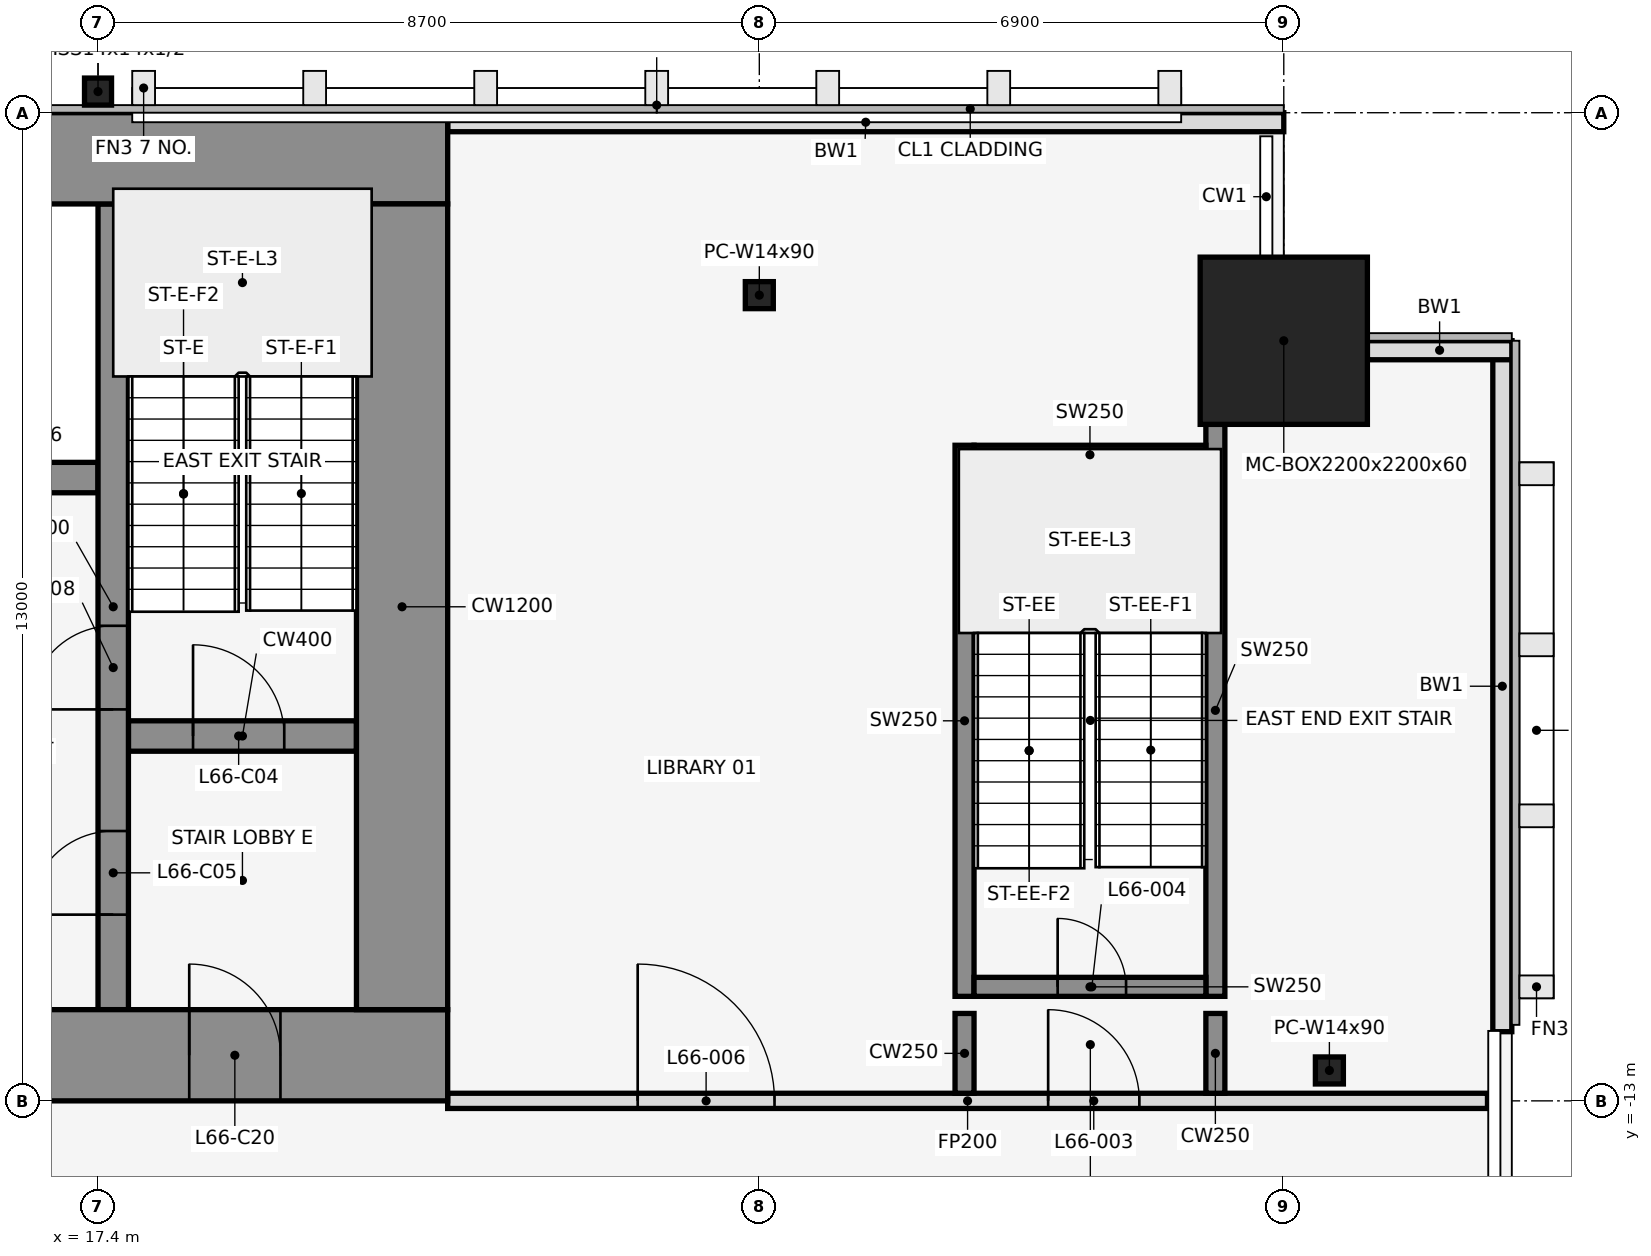
"""IFC4 building model, lengths in metres.
Left out: names, types, materials, properties, quantities, classifications, styles, units other than length and angle.
Written with IfcOpenShell. Run it as: python <this file> out.ifc"""

import sys

from ifc_helpers import new_model, si_unit, direction, frame, frame_2d, origin, origin_2d, place, context, subcontext, project, spatial, rectangle, hollow_rectangle, i_section, extrude, element, fill, save


model = new_model("IFC4")
c1 = context("Model", 3, precision=1e-05, world=origin(), true_north=direction((0.0, 1.0)))
c2 = subcontext(c1, "Body", "Model", "MODEL_VIEW")
j1 = project(units=[si_unit("LENGTHUNIT", "METRE"), si_unit("PLANEANGLEUNIT", "RADIAN")], contexts=[c1])
p1 = place(None, origin())
s1 = spatial("IfcSite", under=j1, at=p1, CompositionType="ELEMENT")
p2 = place(p1, origin())
s2 = spatial("IfcBuilding", under=s1, at=p2, CompositionType="ELEMENT")
p3 = place(p2, frame((0.0, 0.0, 293.0)))
s3 = spatial("IfcBuildingStorey", under=s2, at=p3, CompositionType="ELEMENT", Elevation=293.0)
p4 = place(p3, frame((26.1, -2.4, 0.0), z_axis=(0.0, 0.0, 1.0), x_axis=(1.0, 0.0, 0.0)))
e1 = element("IfcColumn", 1, at=p4, inside=s3, PredefinedType="COLUMN", context=c2, shape_type="SweptSolid", body=[
    extrude(i_section(OverallWidth=0.368, OverallDepth=0.356, WebThickness=0.011, FlangeThickness=0.018, at=origin_2d()), origin(), (0.0, 0.0, 1.0), 4.5),
])
p5 = place(p3, frame((33.0, -3.0, 0.0), z_axis=(0.0, 0.0, 1.0), x_axis=(1.0, 0.0, 0.0)))
e2 = element("IfcColumn", 2, at=p5, inside=s3, PredefinedType="COLUMN", context=c2, shape_type="SweptSolid", body=[
    extrude(hollow_rectangle(XDim=2.2, YDim=2.2, WallThickness=0.06, at=origin_2d()), origin(), (0.0, 0.0, 1.0), 4.5),
])
p6 = place(p3, frame((17.4, 0.278, 0.0), z_axis=(0.0, 0.0, 1.0), x_axis=(1.0, 0.0, 0.0)))
e3 = element("IfcColumn", 3, at=p6, inside=s3, PredefinedType="COLUMN", context=c2, shape_type="SweptSolid", body=[
    extrude(hollow_rectangle(XDim=0.356, YDim=0.356, WallThickness=0.012, at=origin_2d()), origin(), (0.0, 0.0, 1.0), 4.5),
])
p7 = place(p3, frame((33.6, -12.6, 0.0), z_axis=(0.0, 0.0, 1.0), x_axis=(1.0, 0.0, 0.0)))
e4 = element("IfcColumn", 4, at=p7, inside=s3, PredefinedType="COLUMN", context=c2, shape_type="SweptSolid", body=[
    extrude(i_section(OverallWidth=0.368, OverallDepth=0.356, WebThickness=0.011, FlangeThickness=0.018, at=origin_2d()), origin(), (0.0, 0.0, 1.0), 4.5),
])
p8 = place(p3, frame((33.0, -0.125, 0.0), z_axis=(0.0, 0.0, 1.0), x_axis=(-1.0, 0.0, 0.0)))
e5 = element("IfcWall", 5, at=p8, inside=s3, PredefinedType="STANDARD", context=c2, shape_type="SweptSolid", body=[
    extrude(rectangle(XDim=11.0, YDim=0.25, at=frame_2d((5.5, 0.0))), origin(), (0.0, 0.0, 1.0), 4.35),
])
p9 = place(p3, frame((35.875, -12.09, 0.0), z_axis=(0.0, 0.0, 1.0), x_axis=(0.0, 1.0, 0.0)))
e6 = element("IfcWall", 6, at=p9, inside=s3, PredefinedType="STANDARD", context=c2, shape_type="SweptSolid", body=[
    extrude(rectangle(XDim=9.09, YDim=0.25, at=frame_2d((4.545, 0.0))), origin(), (0.0, 0.0, 1.0), 4.35),
])
p10 = place(p3, frame((36.0, -3.125, 0.0), z_axis=(0.0, 0.0, 1.0), x_axis=(-1.0, 0.0, 0.0)))
e7 = element("IfcWall", 7, at=p10, inside=s3, PredefinedType="STANDARD", context=c2, shape_type="SweptSolid", body=[
    extrude(rectangle(XDim=1.9, YDim=0.25, at=frame_2d((0.95, 0.0))), origin(), (0.0, 0.0, 1.0), 4.35),
])
p11 = place(p3, frame((28.8, -11.625, 0.0), z_axis=(0.0, 0.0, 1.0), x_axis=(0.0, 1.0, 0.0)))
e8 = element("IfcWall", 8, at=p11, inside=s3, PredefinedType="SHEAR", context=c2, shape_type="SweptSolid", body=[
    extrude(rectangle(XDim=7.25, YDim=0.25, at=frame_2d((3.625, 0.0))), origin(), (0.0, 0.0, 1.0), 4.5),
])
p12 = place(p3, frame((32.1, -11.625, 0.0), z_axis=(0.0, 0.0, 1.0), x_axis=(0.0, 1.0, 0.0)))
e9 = element("IfcWall", 9, at=p12, inside=s3, PredefinedType="SHEAR", context=c2, shape_type="SweptSolid", body=[
    extrude(rectangle(XDim=7.525, YDim=0.25, at=frame_2d((3.762, 0.0))), origin(), (0.0, 0.0, 1.0), 4.5),
])
p13 = place(p3, frame((28.925, -11.5, 0.0), z_axis=(0.0, 0.0, 1.0), x_axis=(1.0, 0.0, 0.0)))
e10 = element("IfcWall", 10, at=p13, inside=s3, PredefinedType="SHEAR", context=c2, shape_type="SweptSolid", body=[
    extrude(rectangle(XDim=3.05, YDim=0.25, at=frame_2d((1.525, 0.0))), origin(), (0.0, 0.0, 1.0), 4.5),
])
p14 = place(p13, frame((1.1, 0.0, 0.0)))
e11 = element("IfcOpeningElement", 11, at=p14, cuts=e10, PredefinedType="OPENING", context=c2, shape_type="SweptSolid", body=[
    extrude(rectangle(XDim=0.9, YDim=2.1, at=frame_2d((0.45, 1.05))), frame((0.0, 0.137, 0.0), z_axis=(0.0, -1.0, 0.0), x_axis=(1.0, 0.0, 0.0)), (0.0, 0.0, 1.0), 0.274),
])
p15 = place(p3, frame((28.925, -4.5, 0.0), z_axis=(0.0, 0.0, 1.0), x_axis=(1.0, 0.0, 0.0)))
e12 = element("IfcWall", 12, at=p15, inside=s3, PredefinedType="SHEAR", context=c2, shape_type="SweptSolid", body=[
    extrude(rectangle(XDim=3.05, YDim=0.25, at=frame_2d((1.525, 0.0))), origin(), (0.0, 0.0, 1.0), 4.5),
])
p16 = place(p3, frame((22.0, -13.0, 0.0), z_axis=(0.0, 0.0, 1.0), x_axis=(1.0, 0.0, 0.0)))
e13 = element("IfcWall", 13, at=p16, inside=s3, PredefinedType="PARTITIONING", context=c2, shape_type="SweptSolid", body=[
    extrude(rectangle(XDim=13.68, YDim=0.2, at=frame_2d((6.84, 0.0))), origin(), (0.0, 0.0, 1.0), 3.418),
])
p17 = place(p16, frame((7.9, 0.0, 0.0)))
e14 = element("IfcOpeningElement", 14, at=p17, cuts=e13, PredefinedType="OPENING", context=c2, shape_type="SweptSolid", body=[
    extrude(rectangle(XDim=1.2, YDim=2.1, at=frame_2d((0.6, 1.05))), frame((0.0, 0.112, 0.0), z_axis=(0.0, -1.0, 0.0), x_axis=(1.0, 0.0, 0.0)), (0.0, 0.0, 1.0), 0.224),
])
p18 = place(p16, frame((2.5, 0.0, 0.0)))
e15 = element("IfcOpeningElement", 15, at=p18, cuts=e13, PredefinedType="OPENING", context=c2, shape_type="SweptSolid", body=[
    extrude(rectangle(XDim=1.8, YDim=2.1, at=frame_2d((0.9, 1.05))), frame((0.0, 0.112, 0.0), z_axis=(0.0, -1.0, 0.0), x_axis=(1.0, 0.0, 0.0)), (0.0, 0.0, 1.0), 0.224),
])
for number, where, z_axis, x_axis in (
    (16, (28.8, -12.9, 0.0), (0.0, 0.0, 1.0), (0.0, 1.0, 0.0)),
    (17, (32.1, -12.9, 0.0), (0.0, 0.0, 1.0), (0.0, 1.0, 0.0)),
):
    element("IfcWall", number, at=place(p3, frame(where, z_axis=z_axis, x_axis=x_axis)), inside=s3, PredefinedType="SHEAR", context=c2, shape_type="SweptSolid", body=[
        extrude(rectangle(XDim=1.05, YDim=0.25, at=frame_2d((0.525, 0.0))), origin(), (0.0, 0.0, 1.0), 4.5),
    ])
p19 = place(p3, frame((17.8, -8.2, 0.0), z_axis=(0.0, 0.0, 1.0), x_axis=(1.0, 0.0, 0.0)))
e18 = element("IfcWall", 18, at=p19, inside=s3, PredefinedType="SHEAR", context=c2, shape_type="SweptSolid", body=[
    extrude(rectangle(XDim=3.0, YDim=0.4, at=frame_2d((1.5, 0.0))), origin(), (0.0, 0.0, 1.0), 4.5),
])
p20 = place(p19, frame((0.85, 0.0, 0.0)))
e19 = element("IfcOpeningElement", 19, at=p20, cuts=e18, PredefinedType="OPENING", context=c2, shape_type="SweptSolid", body=[
    extrude(rectangle(XDim=1.2, YDim=2.1, at=frame_2d((0.6, 1.05))), frame((0.0, 0.212, 0.0), z_axis=(0.0, -1.0, 0.0), x_axis=(1.0, 0.0, 0.0)), (0.0, 0.0, 1.0), 0.424),
])
p21 = place(p3, frame((3.8, -4.8, 0.0), z_axis=(0.0, 0.0, 1.0), x_axis=(1.0, 0.0, 0.0)))
e20 = element("IfcWall", 20, at=p21, inside=s3, PredefinedType="SHEAR", context=c2, shape_type="SweptSolid", body=[
    extrude(rectangle(XDim=13.6, YDim=0.4, at=frame_2d((6.8, 0.0))), origin(), (0.0, 0.0, 1.0), 4.5),
])
p22 = place(p21, frame((0.75, 0.0, 0.0)))
e21 = element("IfcOpeningElement", 21, at=p22, cuts=e20, PredefinedType="OPENING", context=c2, shape_type="SweptSolid", body=[
    extrude(rectangle(XDim=1.2, YDim=2.1, at=frame_2d((0.6, 1.05))), frame((0.0, 0.212, 0.0), z_axis=(0.0, -1.0, 0.0), x_axis=(1.0, 0.0, 0.0)), (0.0, 0.0, 1.0), 0.424),
])
p23 = place(p21, frame((3.65, 0.0, 0.0)))
e22 = element("IfcOpeningElement", 22, at=p23, cuts=e20, PredefinedType="OPENING", context=c2, shape_type="SweptSolid", body=[
    extrude(rectangle(XDim=1.2, YDim=2.1, at=frame_2d((0.6, 1.05))), frame((0.0, 0.212, 0.0), z_axis=(0.0, -1.0, 0.0), x_axis=(1.0, 0.0, 0.0)), (0.0, 0.0, 1.0), 0.424),
])
p24 = place(p21, frame((6.65, 0.0, 0.0)))
e23 = element("IfcOpeningElement", 23, at=p24, cuts=e20, PredefinedType="OPENING", context=c2, shape_type="SweptSolid", body=[
    extrude(rectangle(XDim=1.2, YDim=2.1, at=frame_2d((0.6, 1.05))), frame((0.0, 0.212, 0.0), z_axis=(0.0, -1.0, 0.0), x_axis=(1.0, 0.0, 0.0)), (0.0, 0.0, 1.0), 0.424),
])
p25 = place(p21, frame((9.45, 0.0, 0.0)))
e24 = element("IfcOpeningElement", 24, at=p25, cuts=e20, PredefinedType="OPENING", context=c2, shape_type="SweptSolid", body=[
    extrude(rectangle(XDim=1.1, YDim=2.1, at=frame_2d((0.55, 1.05))), frame((0.0, 0.212, 0.0), z_axis=(0.0, -1.0, 0.0), x_axis=(1.0, 0.0, 0.0)), (0.0, 0.0, 1.0), 0.424),
])
p26 = place(p21, frame((11.85, 0.0, 0.0)))
e25 = element("IfcOpeningElement", 25, at=p26, cuts=e20, PredefinedType="OPENING", context=c2, shape_type="SweptSolid", body=[
    extrude(rectangle(XDim=1.1, YDim=2.1, at=frame_2d((0.55, 1.05))), frame((0.0, 0.212, 0.0), z_axis=(0.0, -1.0, 0.0), x_axis=(1.0, 0.0, 0.0)), (0.0, 0.0, 1.0), 0.424),
])
p27 = place(p3, frame((17.6, -11.8, 0.0), z_axis=(0.0, 0.0, 1.0), x_axis=(0.0, 1.0, 0.0)))
e26 = element("IfcWall", 26, at=p27, inside=s3, PredefinedType="SHEAR", context=c2, shape_type="SweptSolid", body=[
    extrude(rectangle(XDim=10.6, YDim=0.4, at=frame_2d((5.3, 0.0))), origin(), (0.0, 0.0, 1.0), 4.5),
])
p28 = place(p27, frame((1.25, 0.0, 0.0)))
e27 = element("IfcOpeningElement", 27, at=p28, cuts=e26, PredefinedType="OPENING", context=c2, shape_type="SweptSolid", body=[
    extrude(rectangle(XDim=1.1, YDim=2.1, at=frame_2d((0.55, 1.05))), frame((0.0, 0.212, 0.0), z_axis=(0.0, -1.0, 0.0), x_axis=(1.0, 0.0, 0.0)), (0.0, 0.0, 1.0), 0.424),
])
p29 = place(p27, frame((3.95, 0.0, 0.0)))
e28 = element("IfcOpeningElement", 28, at=p29, cuts=e26, PredefinedType="OPENING", context=c2, shape_type="SweptSolid", body=[
    extrude(rectangle(XDim=1.1, YDim=2.1, at=frame_2d((0.55, 1.05))), frame((0.0, 0.212, 0.0), z_axis=(0.0, -1.0, 0.0), x_axis=(1.0, 0.0, 0.0)), (0.0, 0.0, 1.0), 0.424),
])
p30 = place(p3, frame((-22.0, -0.6, 0.0), z_axis=(0.0, 0.0, 1.0), x_axis=(1.0, 0.0, 0.0)))
e29 = element("IfcWall", 29, at=p30, inside=s3, PredefinedType="SHEAR", context=c2, shape_type="SweptSolid", body=[
    extrude(rectangle(XDim=44.0, YDim=1.2, at=frame_2d((22.0, 0.0))), origin(), (0.0, 0.0, 1.0), 4.5),
])
p31 = place(p30, frame((18.55, 0.0, 0.0)))
e30 = element("IfcOpeningElement", 30, at=p31, cuts=e29, PredefinedType="OPENING", context=c2, shape_type="SweptSolid", body=[
    extrude(rectangle(XDim=0.9, YDim=2.1, at=frame_2d((0.45, 1.05))), frame((0.0, 0.612, 0.0), z_axis=(0.0, -1.0, 0.0), x_axis=(1.0, 0.0, 0.0)), (0.0, 0.0, 1.0), 1.224),
])
p32 = place(p30, frame((24.55, 0.0, 0.0)))
e31 = element("IfcOpeningElement", 31, at=p32, cuts=e29, PredefinedType="OPENING", context=c2, shape_type="SweptSolid", body=[
    extrude(rectangle(XDim=0.9, YDim=2.1, at=frame_2d((0.45, 1.05))), frame((0.0, 0.612, 0.0), z_axis=(0.0, -1.0, 0.0), x_axis=(1.0, 0.0, 0.0)), (0.0, 0.0, 1.0), 1.224),
])
p33 = place(p3, frame((-22.0, -12.4, 0.0), z_axis=(0.0, 0.0, 1.0), x_axis=(1.0, 0.0, 0.0)))
e32 = element("IfcWall", 32, at=p33, inside=s3, PredefinedType="SHEAR", context=c2, shape_type="SweptSolid", body=[
    extrude(rectangle(XDim=44.0, YDim=1.2, at=frame_2d((22.0, 0.0))), origin(), (0.0, 0.0, 1.0), 4.5),
])
p34 = place(p33, frame((2.2, 0.0, 0.0)))
e33 = element("IfcOpeningElement", 33, at=p34, cuts=e32, PredefinedType="OPENING", context=c2, shape_type="SweptSolid", body=[
    extrude(rectangle(XDim=1.2, YDim=2.1, at=frame_2d((0.6, 1.05))), frame((0.0, 0.612, 0.0), z_axis=(0.0, -1.0, 0.0), x_axis=(1.0, 0.0, 0.0)), (0.0, 0.0, 1.0), 1.224),
])
p35 = place(p33, frame((21.4, 0.0, 0.0)))
e34 = element("IfcOpeningElement", 34, at=p35, cuts=e32, PredefinedType="OPENING", context=c2, shape_type="SweptSolid", body=[
    extrude(rectangle(XDim=1.2, YDim=2.1, at=frame_2d((0.6, 1.05))), frame((0.0, 0.612, 0.0), z_axis=(0.0, -1.0, 0.0), x_axis=(1.0, 0.0, 0.0)), (0.0, 0.0, 1.0), 1.224),
])
p36 = place(p33, frame((40.6, 0.0, 0.0)))
e35 = element("IfcOpeningElement", 35, at=p36, cuts=e32, PredefinedType="OPENING", context=c2, shape_type="SweptSolid", body=[
    extrude(rectangle(XDim=1.2, YDim=2.1, at=frame_2d((0.6, 1.05))), frame((0.0, 0.612, 0.0), z_axis=(0.0, -1.0, 0.0), x_axis=(1.0, 0.0, 0.0)), (0.0, 0.0, 1.0), 1.224),
])
p37 = place(p33, frame((16.0, 0.0, 0.0)))
e36 = element("IfcOpeningElement", 36, at=p37, cuts=e32, PredefinedType="OPENING", context=c2, shape_type="SweptSolid", body=[
    extrude(rectangle(XDim=1.8, YDim=2.1, at=frame_2d((0.9, 1.05))), frame((0.0, 0.612, 0.0), z_axis=(0.0, -1.0, 0.0), x_axis=(1.0, 0.0, 0.0)), (0.0, 0.0, 1.0), 1.224),
])
p38 = place(p33, frame((6.3, 0.0, 0.0)))
e37 = element("IfcOpeningElement", 37, at=p38, cuts=e32, PredefinedType="OPENING", context=c2, shape_type="SweptSolid", body=[
    extrude(rectangle(XDim=1.2, YDim=2.1, at=frame_2d((0.6, 1.05))), frame((0.0, 0.612, 0.0), z_axis=(0.0, -1.0, 0.0), x_axis=(1.0, 0.0, 0.0)), (0.0, 0.0, 1.0), 1.224),
])
p39 = place(p33, frame((26.2, 0.0, 0.0)))
e38 = element("IfcOpeningElement", 38, at=p39, cuts=e32, PredefinedType="OPENING", context=c2, shape_type="SweptSolid", body=[
    extrude(rectangle(XDim=1.8, YDim=2.1, at=frame_2d((0.9, 1.05))), frame((0.0, 0.612, 0.0), z_axis=(0.0, -1.0, 0.0), x_axis=(1.0, 0.0, 0.0)), (0.0, 0.0, 1.0), 1.224),
])
p40 = place(p33, frame((36.5, 0.0, 0.0)))
e39 = element("IfcOpeningElement", 39, at=p40, cuts=e32, PredefinedType="OPENING", context=c2, shape_type="SweptSolid", body=[
    extrude(rectangle(XDim=1.2, YDim=2.1, at=frame_2d((0.6, 1.05))), frame((0.0, 0.612, 0.0), z_axis=(0.0, -1.0, 0.0), x_axis=(1.0, 0.0, 0.0)), (0.0, 0.0, 1.0), 1.224),
])
p41 = place(p3, frame((21.4, -11.8, 0.0), z_axis=(0.0, 0.0, 1.0), x_axis=(0.0, 1.0, 0.0)))
e40 = element("IfcWall", 40, at=p41, inside=s3, PredefinedType="SHEAR", context=c2, shape_type="SweptSolid", body=[
    extrude(rectangle(XDim=10.6, YDim=1.2, at=frame_2d((5.3, 0.0))), origin(), (0.0, 0.0, 1.0), 4.5),
])
p42 = place(p17, origin())
e41 = element("IfcDoor", 41, at=p42, inside=s3, OperationType="SINGLE_SWING_RIGHT", PredefinedType="DOOR", context=c2, shape_type="SweptSolid", body=[
    extrude(rectangle(XDim=1.2, YDim=2.1, at=frame_2d((0.6, 1.05))), frame((0.0, 0.025, 0.0), z_axis=(0.0, -1.0, 0.0), x_axis=(1.0, 0.0, 0.0)), (0.0, 0.0, 1.0), 0.05),
])
fill(e14, e41)
p43 = place(p14, origin())
e42 = element("IfcDoor", 42, at=p43, inside=s3, OperationType="SINGLE_SWING_LEFT", PredefinedType="DOOR", context=c2, shape_type="SweptSolid", body=[
    extrude(rectangle(XDim=0.9, YDim=2.1, at=frame_2d((0.45, 1.05))), frame((0.0, 0.025, 0.0), z_axis=(0.0, -1.0, 0.0), x_axis=(1.0, 0.0, 0.0)), (0.0, 0.0, 1.0), 0.05),
])
fill(e11, e42)
p44 = place(p18, origin())
e43 = element("IfcDoor", 43, at=p44, inside=s3, OperationType="SINGLE_SWING_LEFT", PredefinedType="DOOR", context=c2, shape_type="SweptSolid", body=[
    extrude(rectangle(XDim=1.8, YDim=2.1, at=frame_2d((0.9, 1.05))), frame((0.0, 0.025, 0.0), z_axis=(0.0, -1.0, 0.0), x_axis=(1.0, 0.0, 0.0)), (0.0, 0.0, 1.0), 0.05),
])
fill(e15, e43)
p45 = place(p20, origin())
e44 = element("IfcDoor", 44, at=p45, inside=s3, OperationType="SINGLE_SWING_RIGHT", PredefinedType="DOOR", context=c2, shape_type="SweptSolid", body=[
    extrude(rectangle(XDim=1.2, YDim=2.1, at=frame_2d((0.6, 1.05))), frame((0.0, 0.025, 0.0), z_axis=(0.0, -1.0, 0.0), x_axis=(1.0, 0.0, 0.0)), (0.0, 0.0, 1.0), 0.05),
])
fill(e19, e44)
p46 = place(p28, origin())
e45 = element("IfcDoor", 45, at=p46, inside=s3, OperationType="SINGLE_SWING_LEFT", PredefinedType="DOOR", context=c2, shape_type="SweptSolid", body=[
    extrude(rectangle(XDim=1.1, YDim=2.1, at=frame_2d((0.55, 1.05))), frame((0.0, 0.025, 0.0), z_axis=(0.0, -1.0, 0.0), x_axis=(1.0, 0.0, 0.0)), (0.0, 0.0, 1.0), 0.05),
])
fill(e27, e45)
p47 = place(p29, origin())
e46 = element("IfcDoor", 46, at=p47, inside=s3, OperationType="SINGLE_SWING_RIGHT", PredefinedType="DOOR", context=c2, shape_type="SweptSolid", body=[
    extrude(rectangle(XDim=1.1, YDim=2.1, at=frame_2d((0.55, 1.05))), frame((0.0, 0.025, 0.0), z_axis=(0.0, -1.0, 0.0), x_axis=(1.0, 0.0, 0.0)), (0.0, 0.0, 1.0), 0.05),
])
fill(e28, e46)
p48 = place(p36, frame((1.2, 0.0, 0.0), z_axis=(0.0, 0.0, 1.0), x_axis=(-1.0, 0.0, 0.0)))
e47 = element("IfcDoor", 47, at=p48, inside=s3, OperationType="SINGLE_SWING_RIGHT", PredefinedType="DOOR", context=c2, shape_type="SweptSolid", body=[
    extrude(rectangle(XDim=1.2, YDim=2.1, at=frame_2d((0.6, 1.05))), frame((0.0, 0.025, 0.0), z_axis=(0.0, -1.0, 0.0), x_axis=(1.0, 0.0, 0.0)), (0.0, 0.0, 1.0), 0.05),
])
fill(e35, e47)
save(model, sys.argv[1])
